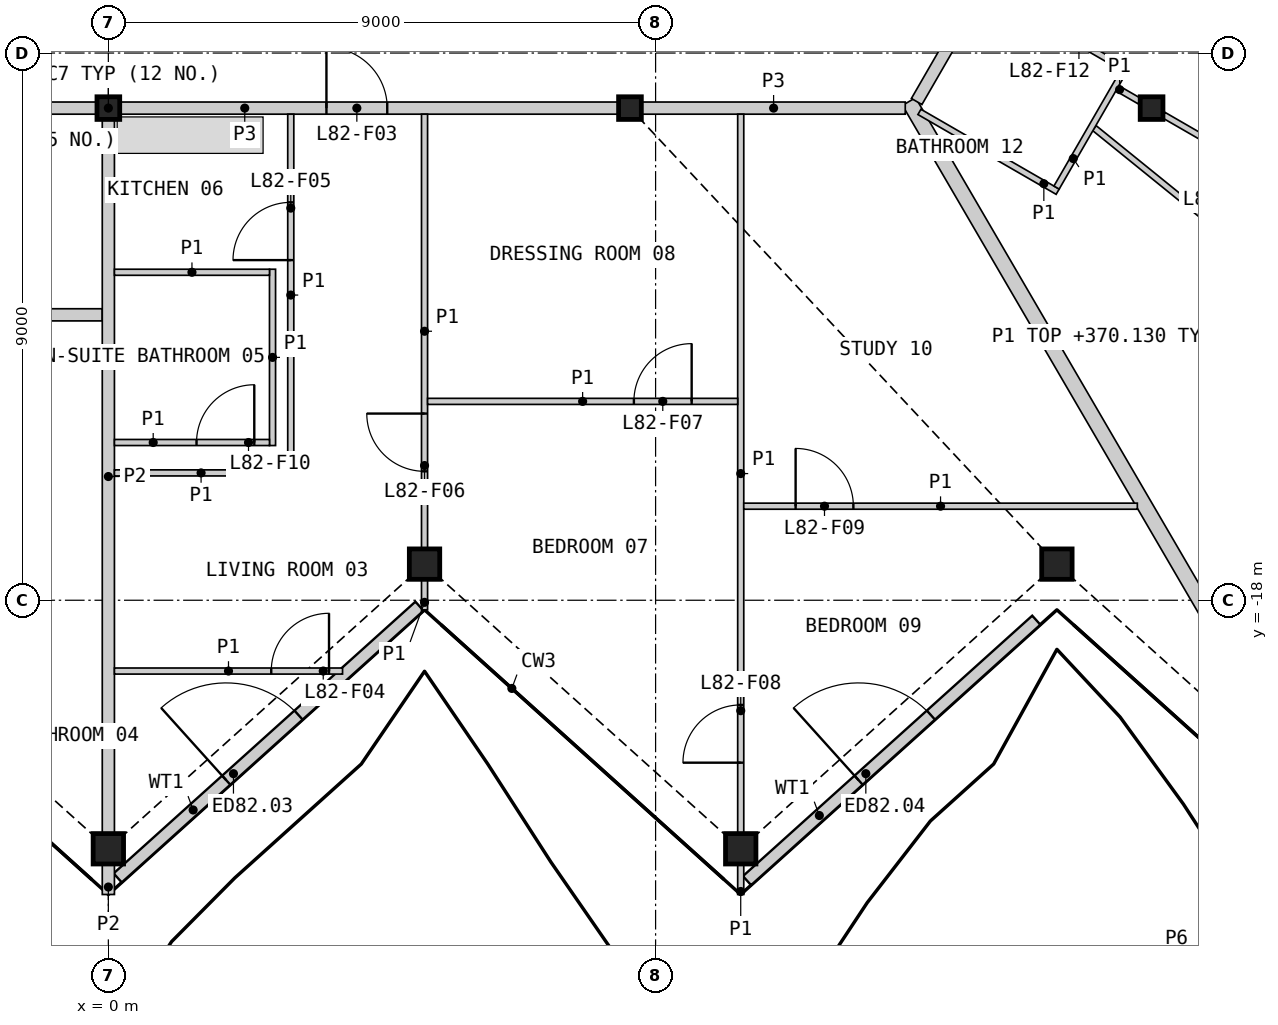
"""IFC4 building model, lengths in metres.
Left out: names, types, materials, properties, quantities, classifications, styles, units other than length and angle.
Written with IfcOpenShell. Run it as: python <this file> out.ifc"""

import sys

from ifc_helpers import new_model, si_unit, direction, frame, frame_2d, origin, origin_2d, place, context, subcontext, project, spatial, rectangle, hollow_rectangle, i_section, extrude, element, fill, save


model = new_model("IFC4")
c1 = context("Model", 3, precision=1e-05, world=origin(), true_north=direction((0.0, 1.0)))
c2 = subcontext(c1, "Body", "Model", "MODEL_VIEW")
j1 = project(units=[si_unit("LENGTHUNIT", "METRE"), si_unit("PLANEANGLEUNIT", "RADIAN")], contexts=[c1])
p1 = place(None, origin())
s1 = spatial("IfcSite", under=j1, at=p1, CompositionType="ELEMENT")
p2 = place(p1, origin())
s2 = spatial("IfcBuilding", under=s1, at=p2, CompositionType="ELEMENT")
p3 = place(p2, frame((0.0, 0.0, 367.8)))
s3 = spatial("IfcBuildingStorey", under=s2, at=p3, CompositionType="ELEMENT", Elevation=367.8)
for number, where, z_axis, x_axis in (
    (1, (0.0, -22.088, 0.0), (0.0, 0.0, 1.0), (1.0, 0.0, 0.0)),
    (2, (5.2, -17.406, 0.0), (0.0, 0.0, 1.0), (1.0, 0.0, 0.0)),
    (3, (10.4, -22.088, 0.0), (0.0, 0.0, 1.0), (1.0, 0.0, 0.0)),
    (4, (15.6, -17.406, 0.0), (0.0, 0.0, 1.0), (1.0, 0.0, 0.0)),
):
    element("IfcColumn", number, at=place(p3, frame(where, z_axis=z_axis, x_axis=x_axis)), inside=s3, PredefinedType="COLUMN", context=c2, shape_type="SweptSolid", body=[
        extrude(hollow_rectangle(XDim=0.5, YDim=0.5, WallThickness=0.03, at=origin_2d()), origin(), (0.0, 0.0, 1.0), 3.4),
    ])
for number, where, z_axis, x_axis in (
    (5, (0.0, -9.906, 0.0), (0.0, 0.0, 1.0), (1.0, 0.0, 0.0)),
    (6, (8.578, -9.906, 0.0), (0.0, 0.0, 1.0), (1.0, 0.0, 0.0)),
    (7, (17.157, -9.906, 0.0), (0.0, 0.0, 1.0), (1.0, 0.0, 0.0)),
):
    element("IfcColumn", number, at=place(p3, frame(where, z_axis=z_axis, x_axis=x_axis)), inside=s3, PredefinedType="COLUMN", context=c2, shape_type="SweptSolid", body=[
        extrude(i_section(OverallWidth=0.374, OverallDepth=0.372, WebThickness=0.016, FlangeThickness=0.026, at=origin_2d()), origin(), (0.0, 0.0, 1.0), 3.4),
    ])
p4 = place(p3, frame((0.154, -22.567, 0.0), z_axis=(0.0, 0.0, 1.0), x_axis=(0.743150529995, 0.669124270796, 0.0)))
e8 = element("IfcWall", 8, at=p4, inside=s3, PredefinedType="SOLIDWALL", context=c2, shape_type="SweptSolid", body=[
    extrude(rectangle(XDim=6.678, YDim=0.2, at=frame_2d((3.339, 0.0))), origin(), (0.0, 0.0, 1.0), 2.634),
])
p5 = place(p4, frame((2.402, 0.0, 0.0)))
e9 = element("IfcOpeningElement", 9, at=p5, cuts=e8, PredefinedType="OPENING", context=c2, shape_type="SweptSolid", body=[
    extrude(rectangle(XDim=1.6, YDim=2.25, at=frame_2d((0.8, 1.125))), frame((0.0, 0.11, 0.0), z_axis=(0.0, -1.0, 0.0), x_axis=(1.0, 0.0, 0.0)), (0.0, 0.0, 1.0), 0.22),
])
p6 = place(p3, frame((10.503, -22.612, 0.0), z_axis=(0.0, 0.0, 1.0), x_axis=(0.743148117717, 0.669126949939, 0.0)))
e10 = element("IfcWall", 10, at=p6, inside=s3, PredefinedType="SOLIDWALL", context=c2, shape_type="SweptSolid", body=[
    extrude(rectangle(XDim=6.402, YDim=0.2, at=frame_2d((3.201, 0.0))), origin(), (0.0, 0.0, 1.0), 2.634),
])
p7 = place(p6, frame((2.469, 0.0, 0.0)))
e11 = element("IfcOpeningElement", 11, at=p7, cuts=e10, PredefinedType="OPENING", context=c2, shape_type="SweptSolid", body=[
    extrude(rectangle(XDim=1.6, YDim=2.25, at=frame_2d((0.8, 1.125))), frame((0.0, 0.11, 0.0), z_axis=(0.0, -1.0, 0.0), x_axis=(1.0, 0.0, 0.0)), (0.0, 0.0, 1.0), 0.22),
])
p8 = place(p3, frame((13.168, -9.798, 0.0), z_axis=(0.0, 0.0, 1.0), x_axis=(0.503632750219, -0.863917850786, 0.0)))
e12 = element("IfcWall", 12, at=p8, inside=s3, PredefinedType="PARTITIONING", context=c2, shape_type="SweptSolid", body=[
    extrude(rectangle(XDim=14.972, YDim=0.25, at=frame_2d((7.486, 0.0))), origin(), (0.0, 0.0, 1.0), 2.33),
])
p9 = place(p3, frame((-8.382, -9.906, 0.0), z_axis=(0.0, 0.0, 1.0), x_axis=(1.0, 0.0, 0.0)))
e13 = element("IfcWall", 13, at=p9, inside=s3, PredefinedType="PARTITIONING", context=c2, shape_type="SweptSolid", body=[
    extrude(rectangle(XDim=8.185, YDim=0.2, at=frame_2d((4.092, 0.0))), origin(), (0.0, 0.0, 1.0), 3.1),
])
p10 = place(p9, frame((3.567, 0.0, 0.0)))
e14 = element("IfcOpeningElement", 14, at=p10, cuts=e13, PredefinedType="OPENING", context=c2, shape_type="SweptSolid", body=[
    extrude(rectangle(XDim=0.95, YDim=2.1, at=frame_2d((0.475, 1.05))), frame((0.0, 0.11, 0.0), z_axis=(0.0, -1.0, 0.0), x_axis=(1.0, 0.0, 0.0)), (0.0, 0.0, 1.0), 0.22),
])
p11 = place(p3, frame((0.197, -9.906, 0.0), z_axis=(0.0, 0.0, 1.0), x_axis=(1.0, 0.0, 0.0)))
e15 = element("IfcWall", 15, at=p11, inside=s3, PredefinedType="PARTITIONING", context=c2, shape_type="SweptSolid", body=[
    extrude(rectangle(XDim=8.185, YDim=0.2, at=frame_2d((4.092, 0.0))), origin(), (0.0, 0.0, 1.0), 3.1),
])
p12 = place(p11, frame((3.39, 0.0, 0.0)))
e16 = element("IfcOpeningElement", 16, at=p12, cuts=e15, PredefinedType="OPENING", context=c2, shape_type="SweptSolid", body=[
    extrude(rectangle(XDim=1.0, YDim=2.1, at=frame_2d((0.5, 1.05))), frame((0.0, 0.11, 0.0), z_axis=(0.0, -1.0, 0.0), x_axis=(1.0, 0.0, 0.0)), (0.0, 0.0, 1.0), 0.22),
])
p13 = place(p3, frame((8.775, -9.906, 0.0), z_axis=(0.0, 0.0, 1.0), x_axis=(1.0, 0.0, 0.0)))
e17 = element("IfcWall", 17, at=p13, inside=s3, PredefinedType="PARTITIONING", context=c2, shape_type="SweptSolid", body=[
    extrude(rectangle(XDim=4.331, YDim=0.2, at=frame_2d((2.165, 0.0))), origin(), (0.0, 0.0, 1.0), 3.1),
])
p14 = place(p3, frame((13.293, -9.797, 0.0), z_axis=(0.0, 0.0, 1.0), x_axis=(0.499977520935, 0.86603838169, 0.0)))
e18 = element("IfcWall", 18, at=p14, inside=s3, PredefinedType="PARTITIONING", context=c2, shape_type="SweptSolid", body=[
    extrude(rectangle(XDim=3.701, YDim=0.2, at=frame_2d((1.851, 0.0))), origin(), (0.0, 0.0, 1.0), 3.1),
])
p15 = place(p14, frame((2.451, 0.0, 0.0)))
e19 = element("IfcOpeningElement", 19, at=p15, cuts=e18, PredefinedType="OPENING", context=c2, shape_type="SweptSolid", body=[
    extrude(rectangle(XDim=1.0, YDim=2.1, at=frame_2d((0.5, 1.05))), frame((0.0, 0.11, 0.0), z_axis=(0.0, -1.0, 0.0), x_axis=(1.0, 0.0, 0.0)), (0.0, 0.0, 1.0), 0.22),
])
p16 = place(p3, frame((-15.094, -13.306, 0.0), z_axis=(0.0, 0.0, 1.0), x_axis=(1.0, 0.0, 0.0)))
e20 = element("IfcWall", 20, at=p16, inside=s3, PredefinedType="PARTITIONING", context=c2, shape_type="SweptSolid", body=[
    extrude(rectangle(XDim=14.994, YDim=0.2, at=frame_2d((7.497, 0.0))), origin(), (0.0, 0.0, 1.0), 2.33),
])
p17 = place(p16, frame((6.27, 0.0, 0.0)))
e21 = element("IfcOpeningElement", 21, at=p17, cuts=e20, PredefinedType="OPENING", context=c2, shape_type="SweptSolid", body=[
    extrude(rectangle(XDim=0.95, YDim=2.1, at=frame_2d((0.475, 1.05))), frame((0.0, 0.11, 0.0), z_axis=(0.0, -1.0, 0.0), x_axis=(1.0, 0.0, 0.0)), (0.0, 0.0, 1.0), 0.22),
])
p18 = place(p3, frame((0.0, -21.828, 0.0), z_axis=(0.0, 0.0, 1.0), x_axis=(0.0, 1.0, 0.0)))
e22 = element("IfcWall", 22, at=p18, inside=s3, PredefinedType="PARTITIONING", context=c2, shape_type="SweptSolid", body=[
    extrude(rectangle(XDim=11.725, YDim=0.2, at=frame_2d((5.863, 0.0))), origin(), (0.0, 0.0, 1.0), 2.33),
])
p19 = place(p3, frame((0.0, -22.839, 0.0), z_axis=(0.0, 0.0, 1.0), x_axis=(0.0, 1.0, 0.0)))
e23 = element("IfcWall", 23, at=p19, inside=s3, PredefinedType="PARTITIONING", context=c2, shape_type="SweptSolid", body=[
    extrude(rectangle(XDim=0.491, YDim=0.2, at=frame_2d((0.246, 0.0))), origin(), (0.0, 0.0, 1.0), 2.33),
])
p20 = place(p3, frame((16.216, -10.234, 0.0), z_axis=(0.0, 0.0, 1.0), x_axis=(0.777145059662, -0.629321504672, 0.0)))
e24 = element("IfcWall", 24, at=p20, inside=s3, PredefinedType="PARTITIONING", context=c2, shape_type="SweptSolid", body=[
    extrude(rectangle(XDim=12.59, YDim=0.1, at=frame_2d((6.295, 0.0))), origin(), (0.0, 0.0, 1.0), 2.33),
])
p21 = place(p20, frame((7.074, 0.0, 0.0)))
e25 = element("IfcOpeningElement", 25, at=p21, cuts=e24, PredefinedType="OPENING", context=c2, shape_type="SweptSolid", body=[
    extrude(rectangle(XDim=0.95, YDim=2.1, at=frame_2d((0.475, 1.05))), frame((0.0, 0.06, 0.0), z_axis=(0.0, -1.0, 0.0), x_axis=(1.0, 0.0, 0.0)), (0.0, 0.0, 1.0), 0.12),
])
p22 = place(p3, frame((10.4, -21.828, 0.0), z_axis=(0.0, 0.0, 1.0), x_axis=(0.0, 1.0, 0.0)))
e26 = element("IfcWall", 26, at=p22, inside=s3, PredefinedType="PARTITIONING", context=c2, shape_type="SweptSolid", body=[
    extrude(rectangle(XDim=11.822, YDim=0.1, at=frame_2d((5.911, 0.0))), origin(), (0.0, 0.0, 1.0), 2.33),
])
p23 = place(p22, frame((1.156, 0.0, 0.0)))
e27 = element("IfcOpeningElement", 27, at=p23, cuts=e26, PredefinedType="OPENING", context=c2, shape_type="SweptSolid", body=[
    extrude(rectangle(XDim=0.95, YDim=2.1, at=frame_2d((0.475, 1.05))), frame((0.0, 0.06, 0.0), z_axis=(0.0, -1.0, 0.0), x_axis=(1.0, 0.0, 0.0)), (0.0, 0.0, 1.0), 0.12),
])
p24 = place(p3, frame((17.354, -10.019, 0.0), z_axis=(0.0, 0.0, 1.0), x_axis=(0.866019680922, -0.500009912158, 0.0)))
e28 = element("IfcWall", 28, at=p24, inside=s3, PredefinedType="PARTITIONING", context=c2, shape_type="SweptSolid", body=[
    extrude(rectangle(XDim=10.881, YDim=0.1, at=frame_2d((5.44, 0.0))), origin(), (0.0, 0.0, 1.0), 2.33),
])
p25 = place(p24, frame((1.655, 0.0, 0.0)))
e29 = element("IfcOpeningElement", 29, at=p25, cuts=e28, PredefinedType="OPENING", context=c2, shape_type="SweptSolid", body=[
    extrude(rectangle(XDim=0.95, YDim=2.1, at=frame_2d((0.475, 1.05))), frame((0.0, 0.06, 0.0), z_axis=(0.0, -1.0, 0.0), x_axis=(1.0, 0.0, 0.0)), (0.0, 0.0, 1.0), 0.12),
])
p26 = place(p3, frame((5.2, -17.146, 0.0), z_axis=(0.0, 0.0, 1.0), x_axis=(0.0, 1.0, 0.0)))
e30 = element("IfcWall", 30, at=p26, inside=s3, PredefinedType="PARTITIONING", context=c2, shape_type="SweptSolid", body=[
    extrude(rectangle(XDim=7.14, YDim=0.1, at=frame_2d((3.57, 0.0))), origin(), (0.0, 0.0, 1.0), 2.33),
])
p27 = place(p26, frame((1.266, 0.0, 0.0)))
e31 = element("IfcOpeningElement", 31, at=p27, cuts=e30, PredefinedType="OPENING", context=c2, shape_type="SweptSolid", body=[
    extrude(rectangle(XDim=0.95, YDim=2.1, at=frame_2d((0.475, 1.05))), frame((0.0, 0.06, 0.0), z_axis=(0.0, -1.0, 0.0), x_axis=(1.0, 0.0, 0.0)), (0.0, 0.0, 1.0), 0.12),
])
p28 = place(p3, frame((10.45, -16.453, 0.0), z_axis=(0.0, 0.0, 1.0), x_axis=(1.0, 0.0, 0.0)))
e32 = element("IfcWall", 32, at=p28, inside=s3, PredefinedType="PARTITIONING", context=c2, shape_type="SweptSolid", body=[
    extrude(rectangle(XDim=6.473, YDim=0.1, at=frame_2d((3.236, 0.0))), origin(), (0.0, 0.0, 1.0), 2.33),
])
p29 = place(p28, frame((0.853, 0.0, 0.0)))
e33 = element("IfcOpeningElement", 33, at=p29, cuts=e32, PredefinedType="OPENING", context=c2, shape_type="SweptSolid", body=[
    extrude(rectangle(XDim=0.95, YDim=2.1, at=frame_2d((0.475, 1.05))), frame((0.0, 0.06, 0.0), z_axis=(0.0, -1.0, 0.0), x_axis=(1.0, 0.0, 0.0)), (0.0, 0.0, 1.0), 0.12),
])
p30 = place(p3, frame((3.0, -15.956, 0.0), z_axis=(0.0, 0.0, 1.0), x_axis=(0.0, 1.0, 0.0)))
e34 = element("IfcWall", 34, at=p30, inside=s3, PredefinedType="PARTITIONING", context=c2, shape_type="SweptSolid", body=[
    extrude(rectangle(XDim=5.95, YDim=0.1, at=frame_2d((2.975, 0.0))), origin(), (0.0, 0.0, 1.0), 2.33),
])
p31 = place(p30, frame((3.55, 0.0, 0.0)))
e35 = element("IfcOpeningElement", 35, at=p31, cuts=e34, PredefinedType="OPENING", context=c2, shape_type="SweptSolid", body=[
    extrude(rectangle(XDim=0.95, YDim=2.1, at=frame_2d((0.475, 1.05))), frame((0.0, 0.06, 0.0), z_axis=(0.0, -1.0, 0.0), x_axis=(1.0, 0.0, 0.0)), (0.0, 0.0, 1.0), 0.12),
])
p32 = place(p3, frame((5.25, -14.729, 0.0), z_axis=(0.0, 0.0, 1.0), x_axis=(1.0, 0.0, 0.0)))
e36 = element("IfcWall", 36, at=p32, inside=s3, PredefinedType="PARTITIONING", context=c2, shape_type="SweptSolid", body=[
    extrude(rectangle(XDim=5.1, YDim=0.1, at=frame_2d((2.55, 0.0))), origin(), (0.0, 0.0, 1.0), 2.33),
])
p33 = place(p32, frame((3.393, 0.0, 0.0)))
e37 = element("IfcOpeningElement", 37, at=p33, cuts=e36, PredefinedType="OPENING", context=c2, shape_type="SweptSolid", body=[
    extrude(rectangle(XDim=0.95, YDim=2.1, at=frame_2d((0.475, 1.05))), frame((0.0, 0.06, 0.0), z_axis=(0.0, -1.0, 0.0), x_axis=(1.0, 0.0, 0.0)), (0.0, 0.0, 1.0), 0.12),
])
p34 = place(p3, frame((0.1, -19.164, 0.0), z_axis=(0.0, 0.0, 1.0), x_axis=(1.0, 0.0, 0.0)))
e38 = element("IfcWall", 38, at=p34, inside=s3, PredefinedType="PARTITIONING", context=c2, shape_type="SweptSolid", body=[
    extrude(rectangle(XDim=3.751, YDim=0.1, at=frame_2d((1.876, 0.0))), origin(), (0.0, 0.0, 1.0), 2.33),
])
p35 = place(p34, frame((2.579, 0.0, 0.0)))
e39 = element("IfcOpeningElement", 39, at=p35, cuts=e38, PredefinedType="OPENING", context=c2, shape_type="SweptSolid", body=[
    extrude(rectangle(XDim=0.95, YDim=2.1, at=frame_2d((0.475, 1.05))), frame((0.0, 0.06, 0.0), z_axis=(0.0, -1.0, 0.0), x_axis=(1.0, 0.0, 0.0)), (0.0, 0.0, 1.0), 0.12),
])
p36 = place(p3, frame((0.1, -15.906, 0.0), z_axis=(0.0, 0.0, 1.0), x_axis=(1.0, 0.0, 0.0)))
e40 = element("IfcWall", 40, at=p36, inside=s3, PredefinedType="PARTITIONING", context=c2, shape_type="SweptSolid", body=[
    extrude(rectangle(XDim=2.85, YDim=0.1, at=frame_2d((1.425, 0.0))), origin(), (0.0, 0.0, 1.0), 2.33),
])
p37 = place(p3, frame((2.7, -15.456, 0.0), z_axis=(0.0, 0.0, 1.0), x_axis=(0.0, 1.0, 0.0)))
e41 = element("IfcWall", 41, at=p37, inside=s3, PredefinedType="PARTITIONING", context=c2, shape_type="SweptSolid", body=[
    extrude(rectangle(XDim=2.9, YDim=0.1, at=frame_2d((1.45, 0.0))), origin(), (0.0, 0.0, 1.0), 2.33),
])
p38 = place(p3, frame((14.467, -7.964, 0.0), z_axis=(0.0, 0.0, 1.0), x_axis=(0.86601223543, -0.500022807565, 0.0)))
e42 = element("IfcWall", 42, at=p38, inside=s3, PredefinedType="PARTITIONING", context=c2, shape_type="SweptSolid", body=[
    extrude(rectangle(XDim=2.65, YDim=0.1, at=frame_2d((1.325, 0.0))), origin(), (0.0, 0.0, 1.0), 2.33),
])
p39 = place(p38, frame((1.014, 0.0, 0.0)))
e43 = element("IfcOpeningElement", 43, at=p39, cuts=e42, PredefinedType="OPENING", context=c2, shape_type="SweptSolid", body=[
    extrude(rectangle(XDim=0.95, YDim=2.1, at=frame_2d((0.475, 1.05))), frame((0.0, 0.06, 0.0), z_axis=(0.0, -1.0, 0.0), x_axis=(1.0, 0.0, 0.0)), (0.0, 0.0, 1.0), 0.12),
])
p40 = place(p3, frame((0.1, -12.606, 0.0), z_axis=(0.0, 0.0, 1.0), x_axis=(1.0, 0.0, 0.0)))
e44 = element("IfcWall", 44, at=p40, inside=s3, PredefinedType="PARTITIONING", context=c2, shape_type="SweptSolid", body=[
    extrude(rectangle(XDim=2.55, YDim=0.1, at=frame_2d((1.275, 0.0))), origin(), (0.0, 0.0, 1.0), 2.33),
])
p41 = place(p3, frame((0.1, -15.406, 0.0), z_axis=(0.0, 0.0, 1.0), x_axis=(1.0, 0.0, 0.0)))
e45 = element("IfcWall", 45, at=p41, inside=s3, PredefinedType="PARTITIONING", context=c2, shape_type="SweptSolid", body=[
    extrude(rectangle(XDim=2.55, YDim=0.1, at=frame_2d((1.275, 0.0))), origin(), (0.0, 0.0, 1.0), 2.33),
])
p42 = place(p41, frame((1.35, 0.0, 0.0)))
e46 = element("IfcOpeningElement", 46, at=p42, cuts=e45, PredefinedType="OPENING", context=c2, shape_type="SweptSolid", body=[
    extrude(rectangle(XDim=0.95, YDim=2.1, at=frame_2d((0.475, 1.05))), frame((0.0, 0.06, 0.0), z_axis=(0.0, -1.0, 0.0), x_axis=(1.0, 0.0, 0.0)), (0.0, 0.0, 1.0), 0.12),
])
p43 = place(p3, frame((13.339, -9.968, 0.0), z_axis=(0.0, 0.0, 1.0), x_axis=(0.866013657776, -0.500020344131, 0.0)))
e47 = element("IfcWall", 47, at=p43, inside=s3, PredefinedType="PARTITIONING", context=c2, shape_type="SweptSolid", body=[
    extrude(rectangle(XDim=2.625, YDim=0.1, at=frame_2d((1.312, 0.0))), origin(), (0.0, 0.0, 1.0), 2.33),
])
p44 = place(p3, frame((15.594, -11.212, 0.0), z_axis=(0.0, 0.0, 1.0), x_axis=(0.499981787252, 0.866035918664, 0.0)))
e48 = element("IfcWall", 48, at=p44, inside=s3, PredefinedType="PARTITIONING", context=c2, shape_type="SweptSolid", body=[
    extrude(rectangle(XDim=2.2, YDim=0.1, at=frame_2d((1.1, 0.0))), origin(), (0.0, 0.0, 1.0), 2.33),
])
for number, where, z_axis, x_axis in (
    (49, (10.4, -22.839, 0.0), (0.0, 0.0, 1.0), (0.0, 1.0, 0.0)),
    (50, (5.2, -18.157, 0.0), (0.0, 0.0, 1.0), (0.0, 1.0, 0.0)),
):
    element("IfcWall", number, at=place(p3, frame(where, z_axis=z_axis, x_axis=x_axis)), inside=s3, PredefinedType="PARTITIONING", context=c2, shape_type="SweptSolid", body=[
        extrude(rectangle(XDim=0.491, YDim=0.1, at=frame_2d((0.246, 0.0))), origin(), (0.0, 0.0, 1.0), 2.33),
    ])
p45 = place(p3, frame((16.594, -9.581, 0.0), z_axis=(0.0, 0.0, 1.0), x_axis=(0.866137484628, -0.499805820016, 0.0)))
e51 = element("IfcWall", 51, at=p45, inside=s3, PredefinedType="PARTITIONING", context=c2, shape_type="SweptSolid", body=[
    extrude(rectangle(XDim=0.423, YDim=0.1, at=frame_2d((0.211, 0.0))), origin(), (0.0, 0.0, 1.0), 2.33),
])
p46 = place(p5, origin())
e52 = element("IfcDoor", 52, at=p46, inside=s3, OperationType="DOUBLE_DOOR_SINGLE_SWING", PredefinedType="DOOR", context=c2, shape_type="SweptSolid", body=[
    extrude(rectangle(XDim=1.6, YDim=2.25, at=frame_2d((0.8, 1.125))), frame((0.0, 0.025, 0.0), z_axis=(0.0, -1.0, 0.0), x_axis=(1.0, 0.0, 0.0)), (0.0, 0.0, 1.0), 0.05),
])
fill(e9, e52)
p47 = place(p7, origin())
e53 = element("IfcDoor", 53, at=p47, inside=s3, OperationType="DOUBLE_DOOR_SINGLE_SWING", PredefinedType="DOOR", context=c2, shape_type="SweptSolid", body=[
    extrude(rectangle(XDim=1.6, YDim=2.25, at=frame_2d((0.8, 1.125))), frame((0.0, 0.025, 0.0), z_axis=(0.0, -1.0, 0.0), x_axis=(1.0, 0.0, 0.0)), (0.0, 0.0, 1.0), 0.05),
])
fill(e11, e53)
p48 = place(p12, origin())
e54 = element("IfcDoor", 54, at=p48, inside=s3, OperationType="SINGLE_SWING_LEFT", PredefinedType="DOOR", context=c2, shape_type="SweptSolid", body=[
    extrude(rectangle(XDim=1.0, YDim=2.1, at=frame_2d((0.5, 1.05))), frame((0.0, 0.025, 0.0), z_axis=(0.0, -1.0, 0.0), x_axis=(1.0, 0.0, 0.0)), (0.0, 0.0, 1.0), 0.05),
])
fill(e16, e54)
p49 = place(p35, origin())
e55 = element("IfcDoor", 55, at=p49, inside=s3, OperationType="SINGLE_SWING_RIGHT", PredefinedType="DOOR", context=c2, shape_type="SweptSolid", body=[
    extrude(rectangle(XDim=0.95, YDim=2.1, at=frame_2d((0.475, 1.05))), frame((0.0, 0.025, 0.0), z_axis=(0.0, -1.0, 0.0), x_axis=(1.0, 0.0, 0.0)), (0.0, 0.0, 1.0), 0.05),
])
fill(e39, e55)
p50 = place(p31, origin())
e56 = element("IfcDoor", 56, at=p50, inside=s3, OperationType="SINGLE_SWING_LEFT", PredefinedType="DOOR", context=c2, shape_type="SweptSolid", body=[
    extrude(rectangle(XDim=0.95, YDim=2.1, at=frame_2d((0.475, 1.05))), frame((0.0, 0.025, 0.0), z_axis=(0.0, -1.0, 0.0), x_axis=(1.0, 0.0, 0.0)), (0.0, 0.0, 1.0), 0.05),
])
fill(e35, e56)
p51 = place(p27, origin())
e57 = element("IfcDoor", 57, at=p51, inside=s3, OperationType="SINGLE_SWING_RIGHT", PredefinedType="DOOR", context=c2, shape_type="SweptSolid", body=[
    extrude(rectangle(XDim=0.95, YDim=2.1, at=frame_2d((0.475, 1.05))), frame((0.0, 0.025, 0.0), z_axis=(0.0, -1.0, 0.0), x_axis=(1.0, 0.0, 0.0)), (0.0, 0.0, 1.0), 0.05),
])
fill(e31, e57)
p52 = place(p33, origin())
e58 = element("IfcDoor", 58, at=p52, inside=s3, OperationType="SINGLE_SWING_RIGHT", PredefinedType="DOOR", context=c2, shape_type="SweptSolid", body=[
    extrude(rectangle(XDim=0.95, YDim=2.1, at=frame_2d((0.475, 1.05))), frame((0.0, 0.025, 0.0), z_axis=(0.0, -1.0, 0.0), x_axis=(1.0, 0.0, 0.0)), (0.0, 0.0, 1.0), 0.05),
])
fill(e37, e58)
p53 = place(p23, origin())
e59 = element("IfcDoor", 59, at=p53, inside=s3, OperationType="SINGLE_SWING_LEFT", PredefinedType="DOOR", context=c2, shape_type="SweptSolid", body=[
    extrude(rectangle(XDim=0.95, YDim=2.1, at=frame_2d((0.475, 1.05))), frame((0.0, 0.025, 0.0), z_axis=(0.0, -1.0, 0.0), x_axis=(1.0, 0.0, 0.0)), (0.0, 0.0, 1.0), 0.05),
])
fill(e27, e59)
p54 = place(p29, origin())
e60 = element("IfcDoor", 60, at=p54, inside=s3, OperationType="SINGLE_SWING_LEFT", PredefinedType="DOOR", context=c2, shape_type="SweptSolid", body=[
    extrude(rectangle(XDim=0.95, YDim=2.1, at=frame_2d((0.475, 1.05))), frame((0.0, 0.025, 0.0), z_axis=(0.0, -1.0, 0.0), x_axis=(1.0, 0.0, 0.0)), (0.0, 0.0, 1.0), 0.05),
])
fill(e33, e60)
p55 = place(p42, origin())
e61 = element("IfcDoor", 61, at=p55, inside=s3, OperationType="SINGLE_SWING_RIGHT", PredefinedType="DOOR", context=c2, shape_type="SweptSolid", body=[
    extrude(rectangle(XDim=0.95, YDim=2.1, at=frame_2d((0.475, 1.05))), frame((0.0, 0.025, 0.0), z_axis=(0.0, -1.0, 0.0), x_axis=(1.0, 0.0, 0.0)), (0.0, 0.0, 1.0), 0.05),
])
fill(e46, e61)
save(model, sys.argv[1])
